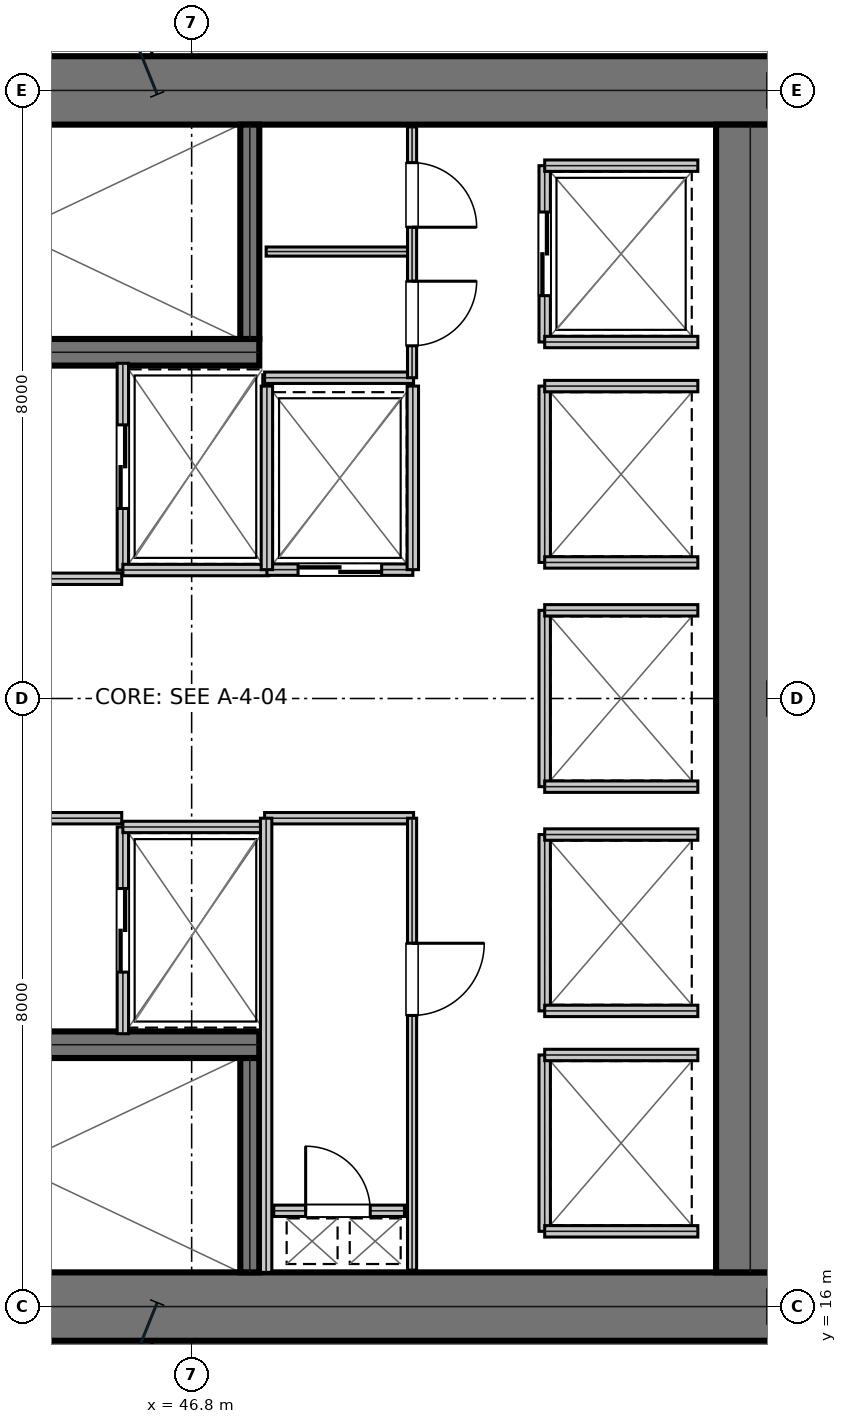
"""IFC4 building model, lengths in metres.
Left out: names, types, materials, properties, quantities, classifications, styles, units other than length and angle.
Written with IfcOpenShell. Run it as: python <this file> out.ifc"""

import sys

from ifc_helpers import new_model, si_unit, direction, frame, frame_2d, origin, place, context, subcontext, project, spatial, rectangle, extrude, element, fill, save


model = new_model("IFC4")
c1 = context("Model", 3, precision=1e-05, world=origin(), true_north=direction((0.0, 1.0)))
c2 = subcontext(c1, "Body", "Model", "MODEL_VIEW")
j1 = project(units=[si_unit("LENGTHUNIT", "METRE"), si_unit("PLANEANGLEUNIT", "RADIAN")], contexts=[c1])
p1 = place(None, origin())
s1 = spatial("IfcSite", under=j1, at=p1, CompositionType="ELEMENT")
p2 = place(p1, origin())
s2 = spatial("IfcBuilding", under=s1, at=p2, CompositionType="ELEMENT")
p3 = place(p2, frame((0.0, 0.0, 62.1)))
s3 = spatial("IfcBuildingStorey", under=s2, at=p3, CompositionType="ELEMENT", Elevation=62.1)
for number, where, z_axis, x_axis in (
    (1, (38.8, 32.0, 0.0), (0.0, 0.0, 1.0), (1.0, 0.0, 0.0)),
    (2, (38.8, 16.0, 0.0), (0.0, 0.0, 1.0), (1.0, 0.0, 0.0)),
):
    element("IfcWall", number, at=place(p3, frame(where, z_axis=z_axis, x_axis=x_axis)), inside=s3, PredefinedType="SHEAR", context=c2, shape_type="SweptSolid", body=[
        extrude(rectangle(XDim=16.0, YDim=0.9, at=frame_2d((8.0, 0.0))), origin(), (0.0, 0.0, 1.0), 3.81),
    ])
p4 = place(p3, frame((54.15, 16.45, 0.0), z_axis=(0.0, 0.0, 1.0), x_axis=(0.0, 1.0, 0.0)))
e3 = element("IfcWall", 3, at=p4, inside=s3, PredefinedType="SHEAR", context=c2, shape_type="SweptSolid", body=[
    extrude(rectangle(XDim=15.1, YDim=0.9, at=frame_2d((7.55, 0.0))), origin(), (0.0, 0.0, 1.0), 3.81),
])
p5 = place(p3, frame((39.98, 28.555, 0.0), z_axis=(0.0, 0.0, 1.0), x_axis=(1.0, 0.0, 0.0)))
e4 = element("IfcWall", 4, at=p5, inside=s3, PredefinedType="SHEAR", context=c2, shape_type="SweptSolid", body=[
    extrude(rectangle(XDim=7.71, YDim=0.35, at=frame_2d((3.855, 0.0))), origin(), (0.0, 0.0, 1.0), 3.81),
])
p6 = place(p5, frame((0.25, 0.0, 0.0)))
e5 = element("IfcOpeningElement", 5, at=p6, cuts=e4, PredefinedType="OPENING", context=c2, shape_type="SweptSolid", body=[
    extrude(rectangle(XDim=1.1, YDim=2.15, at=frame_2d((0.55, 1.075))), frame((0.0, 0.185, 0.0), z_axis=(0.0, -1.0, 0.0), x_axis=(1.0, 0.0, 0.0)), (0.0, 0.0, 1.0), 0.37),
])
p7 = place(p3, frame((39.98, 19.445, 0.0), z_axis=(0.0, 0.0, 1.0), x_axis=(1.0, 0.0, 0.0)))
e6 = element("IfcWall", 6, at=p7, inside=s3, PredefinedType="SHEAR", context=c2, shape_type="SweptSolid", body=[
    extrude(rectangle(XDim=7.71, YDim=0.35, at=frame_2d((3.855, 0.0))), origin(), (0.0, 0.0, 1.0), 3.81),
])
p8 = place(p7, frame((0.25, 0.0, 0.0)))
e7 = element("IfcOpeningElement", 7, at=p8, cuts=e6, PredefinedType="OPENING", context=c2, shape_type="SweptSolid", body=[
    extrude(rectangle(XDim=1.1, YDim=2.15, at=frame_2d((0.55, 1.075))), frame((0.0, 0.185, 0.0), z_axis=(0.0, -1.0, 0.0), x_axis=(1.0, 0.0, 0.0)), (0.0, 0.0, 1.0), 0.37),
])
for number, where, z_axis, x_axis in (
    (8, (47.565, 28.73, 0.0), (0.0, 0.0, 1.0), (0.0, 1.0, 0.0)),
    (9, (47.565, 16.45, 0.0), (0.0, 0.0, 1.0), (0.0, 1.0, 0.0)),
):
    element("IfcWall", number, at=place(p3, frame(where, z_axis=z_axis, x_axis=x_axis)), inside=s3, PredefinedType="SHEAR", context=c2, shape_type="SweptSolid", body=[
        extrude(rectangle(XDim=2.82, YDim=0.25, at=frame_2d((1.41, 0.0))), origin(), (0.0, 0.0, 1.0), 3.81),
    ])
p9 = place(p3, frame((39.98, 25.575, 0.0), z_axis=(0.0, 0.0, 1.0), x_axis=(1.0, 0.0, 0.0)))
e10 = element("IfcWall", 10, at=p9, inside=s3, PredefinedType="PARTITIONING", context=c2, shape_type="SweptSolid", body=[
    extrude(rectangle(XDim=5.9, YDim=0.15, at=frame_2d((2.95, 0.0))), origin(), (0.0, 0.0, 1.0), 3.81),
])
p10 = place(p9, frame((2.35, 0.0, 0.0)))
e11 = element("IfcOpeningElement", 11, at=p10, cuts=e10, PredefinedType="OPENING", context=c2, shape_type="SweptSolid", body=[
    extrude(rectangle(XDim=1.05, YDim=2.15, at=frame_2d((0.525, 1.075))), frame((0.0, 0.085, 0.0), z_axis=(0.0, -1.0, 0.0), x_axis=(1.0, 0.0, 0.0)), (0.0, 0.0, 1.0), 0.17),
])
p11 = place(p3, frame((39.98, 22.425, 0.0), z_axis=(0.0, 0.0, 1.0), x_axis=(1.0, 0.0, 0.0)))
e12 = element("IfcWall", 12, at=p11, inside=s3, PredefinedType="PARTITIONING", context=c2, shape_type="SweptSolid", body=[
    extrude(rectangle(XDim=5.9, YDim=0.15, at=frame_2d((2.95, 0.0))), origin(), (0.0, 0.0, 1.0), 3.81),
])
p12 = place(p11, frame((2.35, 0.0, 0.0)))
e13 = element("IfcOpeningElement", 13, at=p12, cuts=e12, PredefinedType="OPENING", context=c2, shape_type="SweptSolid", body=[
    extrude(rectangle(XDim=1.05, YDim=2.15, at=frame_2d((0.525, 1.075))), frame((0.0, 0.085, 0.0), z_axis=(0.0, -1.0, 0.0), x_axis=(1.0, 0.0, 0.0)), (0.0, 0.0, 1.0), 0.17),
])
p13 = place(p3, frame((45.895, 25.69, 0.0), z_axis=(0.0, 0.0, 1.0), x_axis=(0.0, 1.0, 0.0)))
e14 = element("IfcWall", 14, at=p13, inside=s3, PredefinedType="PARTITIONING", context=c2, shape_type="SweptSolid", body=[
    extrude(rectangle(XDim=2.72, YDim=0.15, at=frame_2d((1.36, 0.0))), origin(), (0.0, 0.0, 1.0), 3.81),
])
p14 = place(p13, frame((0.81, 0.0, 0.0)))
e15 = element("IfcOpeningElement", 15, at=p14, cuts=e14, PredefinedType="OPENING", context=c2, shape_type="SweptSolid", body=[
    extrude(rectangle(XDim=1.1, YDim=2.15, at=frame_2d((0.55, 1.075))), frame((0.0, 0.085, 0.0), z_axis=(0.0, -1.0, 0.0), x_axis=(1.0, 0.0, 0.0)), (0.0, 0.0, 1.0), 0.17),
])
p15 = place(p3, frame((45.895, 25.69, 0.0), z_axis=(0.0, 0.0, 1.0), x_axis=(1.0, 0.0, 0.0)))
e16 = element("IfcWall", 16, at=p15, inside=s3, PredefinedType="PARTITIONING", context=c2, shape_type="SweptSolid", body=[
    extrude(rectangle(XDim=1.915, YDim=0.15, at=frame_2d((0.958, 0.0))), origin(), (0.0, 0.0, 1.0), 3.81),
])
p16 = place(p3, frame((45.895, 19.59, 0.0), z_axis=(0.0, 0.0, 1.0), x_axis=(0.0, 1.0, 0.0)))
e17 = element("IfcWall", 17, at=p16, inside=s3, PredefinedType="PARTITIONING", context=c2, shape_type="SweptSolid", body=[
    extrude(rectangle(XDim=2.72, YDim=0.15, at=frame_2d((1.36, 0.0))), origin(), (0.0, 0.0, 1.0), 3.81),
])
p17 = place(p16, frame((0.81, 0.0, 0.0)))
e18 = element("IfcOpeningElement", 18, at=p17, cuts=e17, PredefinedType="OPENING", context=c2, shape_type="SweptSolid", body=[
    extrude(rectangle(XDim=1.1, YDim=2.15, at=frame_2d((0.55, 1.075))), frame((0.0, 0.085, 0.0), z_axis=(0.0, -1.0, 0.0), x_axis=(1.0, 0.0, 0.0)), (0.0, 0.0, 1.0), 0.17),
])
p18 = place(p3, frame((45.895, 22.31, 0.0), z_axis=(0.0, 0.0, 1.0), x_axis=(1.0, 0.0, 0.0)))
e19 = element("IfcWall", 19, at=p18, inside=s3, PredefinedType="PARTITIONING", context=c2, shape_type="SweptSolid", body=[
    extrude(rectangle(XDim=1.915, YDim=0.15, at=frame_2d((0.958, 0.0))), origin(), (0.0, 0.0, 1.0), 3.81),
])
p19 = place(p3, frame((47.79, 25.695, 0.0), z_axis=(0.0, 0.0, 1.0), x_axis=(1.0, 0.0, 0.0)))
e20 = element("IfcWall", 20, at=p19, inside=s3, PredefinedType="PARTITIONING", context=c2, shape_type="SweptSolid", body=[
    extrude(rectangle(XDim=1.92, YDim=0.15, at=frame_2d((0.96, 0.0))), origin(), (0.0, 0.0, 1.0), 3.81),
])
p20 = place(p19, frame((0.41, 0.0, 0.0)))
e21 = element("IfcOpeningElement", 21, at=p20, cuts=e20, PredefinedType="OPENING", context=c2, shape_type="SweptSolid", body=[
    extrude(rectangle(XDim=1.1, YDim=2.15, at=frame_2d((0.55, 1.075))), frame((0.0, 0.085, 0.0), z_axis=(0.0, -1.0, 0.0), x_axis=(1.0, 0.0, 0.0)), (0.0, 0.0, 1.0), 0.17),
])
for number, where, z_axis, x_axis in (
    (22, (47.79, 25.695, 0.0), (0.0, 0.0, 1.0), (0.0, 1.0, 0.0)),
    (23, (49.71, 25.695, 0.0), (0.0, 0.0, 1.0), (0.0, 1.0, 0.0)),
):
    element("IfcWall", number, at=place(p3, frame(where, z_axis=z_axis, x_axis=x_axis)), inside=s3, PredefinedType="PARTITIONING", context=c2, shape_type="SweptSolid", body=[
        extrude(rectangle(XDim=2.415, YDim=0.15, at=frame_2d((1.208, 0.0))), origin(), (0.0, 0.0, 1.0), 3.81),
    ])
p21 = place(p3, frame((51.445, 28.69, 0.0), z_axis=(0.0, 0.0, 1.0), x_axis=(0.0, 1.0, 0.0)))
e24 = element("IfcWall", 24, at=p21, inside=s3, PredefinedType="PARTITIONING", context=c2, shape_type="SweptSolid", body=[
    extrude(rectangle(XDim=2.32, YDim=0.15, at=frame_2d((1.16, 0.0))), origin(), (0.0, 0.0, 1.0), 3.81),
])
p22 = place(p21, frame((0.61, 0.0, 0.0)))
e25 = element("IfcOpeningElement", 25, at=p22, cuts=e24, PredefinedType="OPENING", context=c2, shape_type="SweptSolid", body=[
    extrude(rectangle(XDim=1.1, YDim=2.15, at=frame_2d((0.55, 1.075))), frame((0.0, 0.085, 0.0), z_axis=(0.0, -1.0, 0.0), x_axis=(1.0, 0.0, 0.0)), (0.0, 0.0, 1.0), 0.17),
])
for number, where, z_axis, x_axis in (
    (26, (51.445, 28.69, 0.0), (0.0, 0.0, 1.0), (1.0, 0.0, 0.0)),
    (27, (51.445, 31.01, 0.0), (0.0, 0.0, 1.0), (1.0, 0.0, 0.0)),
):
    element("IfcWall", number, at=place(p3, frame(where, z_axis=z_axis, x_axis=x_axis)), inside=s3, PredefinedType="PARTITIONING", context=c2, shape_type="SweptSolid", body=[
        extrude(rectangle(XDim=2.015, YDim=0.15, at=frame_2d((1.007, 0.0))), origin(), (0.0, 0.0, 1.0), 3.81),
    ])
p23 = place(p3, frame((51.445, 25.79, 0.0), z_axis=(0.0, 0.0, 1.0), x_axis=(0.0, 1.0, 0.0)))
e28 = element("IfcWall", 28, at=p23, inside=s3, PredefinedType="PARTITIONING", context=c2, shape_type="SweptSolid", body=[
    extrude(rectangle(XDim=2.32, YDim=0.15, at=frame_2d((1.16, 0.0))), origin(), (0.0, 0.0, 1.0), 3.81),
])
for number, where, z_axis, x_axis in (
    (29, (51.445, 25.79, 0.0), (0.0, 0.0, 1.0), (1.0, 0.0, 0.0)),
    (30, (51.445, 28.11, 0.0), (0.0, 0.0, 1.0), (1.0, 0.0, 0.0)),
):
    element("IfcWall", number, at=place(p3, frame(where, z_axis=z_axis, x_axis=x_axis)), inside=s3, PredefinedType="PARTITIONING", context=c2, shape_type="SweptSolid", body=[
        extrude(rectangle(XDim=2.015, YDim=0.15, at=frame_2d((1.007, 0.0))), origin(), (0.0, 0.0, 1.0), 3.81),
    ])
p24 = place(p3, frame((51.445, 19.89, 0.0), z_axis=(0.0, 0.0, 1.0), x_axis=(0.0, 1.0, 0.0)))
e31 = element("IfcWall", 31, at=p24, inside=s3, PredefinedType="PARTITIONING", context=c2, shape_type="SweptSolid", body=[
    extrude(rectangle(XDim=2.32, YDim=0.15, at=frame_2d((1.16, 0.0))), origin(), (0.0, 0.0, 1.0), 3.81),
])
for number, where, z_axis, x_axis in (
    (32, (51.445, 19.89, 0.0), (0.0, 0.0, 1.0), (1.0, 0.0, 0.0)),
    (33, (51.445, 22.21, 0.0), (0.0, 0.0, 1.0), (1.0, 0.0, 0.0)),
):
    element("IfcWall", number, at=place(p3, frame(where, z_axis=z_axis, x_axis=x_axis)), inside=s3, PredefinedType="PARTITIONING", context=c2, shape_type="SweptSolid", body=[
        extrude(rectangle(XDim=2.015, YDim=0.15, at=frame_2d((1.007, 0.0))), origin(), (0.0, 0.0, 1.0), 3.81),
    ])
p25 = place(p3, frame((51.445, 22.84, 0.0), z_axis=(0.0, 0.0, 1.0), x_axis=(0.0, 1.0, 0.0)))
e34 = element("IfcWall", 34, at=p25, inside=s3, PredefinedType="PARTITIONING", context=c2, shape_type="SweptSolid", body=[
    extrude(rectangle(XDim=2.32, YDim=0.15, at=frame_2d((1.16, 0.0))), origin(), (0.0, 0.0, 1.0), 3.81),
])
for number, where, z_axis, x_axis in (
    (35, (51.445, 22.84, 0.0), (0.0, 0.0, 1.0), (1.0, 0.0, 0.0)),
    (36, (51.445, 25.16, 0.0), (0.0, 0.0, 1.0), (1.0, 0.0, 0.0)),
):
    element("IfcWall", number, at=place(p3, frame(where, z_axis=z_axis, x_axis=x_axis)), inside=s3, PredefinedType="PARTITIONING", context=c2, shape_type="SweptSolid", body=[
        extrude(rectangle(XDim=2.015, YDim=0.15, at=frame_2d((1.007, 0.0))), origin(), (0.0, 0.0, 1.0), 3.81),
    ])
p26 = place(p3, frame((51.445, 16.99, 0.0), z_axis=(0.0, 0.0, 1.0), x_axis=(0.0, 1.0, 0.0)))
e37 = element("IfcWall", 37, at=p26, inside=s3, PredefinedType="PARTITIONING", context=c2, shape_type="SweptSolid", body=[
    extrude(rectangle(XDim=2.32, YDim=0.15, at=frame_2d((1.16, 0.0))), origin(), (0.0, 0.0, 1.0), 3.81),
])
for number, where, z_axis, x_axis in (
    (38, (51.445, 16.99, 0.0), (0.0, 0.0, 1.0), (1.0, 0.0, 0.0)),
    (39, (51.445, 19.31, 0.0), (0.0, 0.0, 1.0), (1.0, 0.0, 0.0)),
):
    element("IfcWall", number, at=place(p3, frame(where, z_axis=z_axis, x_axis=x_axis)), inside=s3, PredefinedType="PARTITIONING", context=c2, shape_type="SweptSolid", body=[
        extrude(rectangle(XDim=2.015, YDim=0.15, at=frame_2d((1.007, 0.0))), origin(), (0.0, 0.0, 1.0), 3.81),
    ])
p27 = place(p3, frame((47.88, 17.26, 0.0), z_axis=(0.0, 0.0, 1.0), x_axis=(1.0, 0.0, 0.0)))
e40 = element("IfcWall", 40, at=p27, inside=s3, PredefinedType="PARTITIONING", context=c2, shape_type="SweptSolid", body=[
    extrude(rectangle(XDim=1.72, YDim=0.15, at=frame_2d((0.86, 0.0))), origin(), (0.0, 0.0, 1.0), 3.81),
])
p28 = place(p27, frame((0.42, 0.0, 0.0)))
e41 = element("IfcOpeningElement", 41, at=p28, cuts=e40, PredefinedType="OPENING", context=c2, shape_type="SweptSolid", body=[
    extrude(rectangle(XDim=0.85, YDim=2.15, at=frame_2d((0.425, 1.075))), frame((0.0, 0.085, 0.0), z_axis=(0.0, -1.0, 0.0), x_axis=(1.0, 0.0, 0.0)), (0.0, 0.0, 1.0), 0.17),
])
p29 = place(p3, frame((47.76, 22.425, 0.0), z_axis=(0.0, 0.0, 1.0), x_axis=(1.0, 0.0, 0.0)))
e42 = element("IfcWall", 42, at=p29, inside=s3, PredefinedType="PARTITIONING", context=c2, shape_type="SweptSolid", body=[
    extrude(rectangle(XDim=1.96, YDim=0.15, at=frame_2d((0.98, 0.0))), origin(), (0.0, 0.0, 1.0), 3.81),
])
p30 = place(p3, frame((47.78, 16.45, 0.0), z_axis=(0.0, 0.0, 1.0), x_axis=(0.0, 1.0, 0.0)))
e43 = element("IfcWall", 43, at=p30, inside=s3, PredefinedType="PARTITIONING", context=c2, shape_type="SweptSolid", body=[
    extrude(rectangle(XDim=5.975, YDim=0.15, at=frame_2d((2.988, 0.0))), origin(), (0.0, 0.0, 1.0), 3.81),
])
p31 = place(p3, frame((49.7, 16.48, 0.0), z_axis=(0.0, 0.0, 1.0), x_axis=(0.0, 1.0, 0.0)))
e44 = element("IfcWall", 44, at=p31, inside=s3, PredefinedType="PARTITIONING", context=c2, shape_type="SweptSolid", body=[
    extrude(rectangle(XDim=5.945, YDim=0.12, at=frame_2d((2.973, 0.0))), origin(), (0.0, 0.0, 1.0), 3.81),
])
p32 = place(p31, frame((3.35, 0.0, 0.0)))
e45 = element("IfcOpeningElement", 45, at=p32, cuts=e44, PredefinedType="OPENING", context=c2, shape_type="SweptSolid", body=[
    extrude(rectangle(XDim=0.95, YDim=2.15, at=frame_2d((0.475, 1.075))), frame((0.0, 0.07, 0.0), z_axis=(0.0, -1.0, 0.0), x_axis=(1.0, 0.0, 0.0)), (0.0, 0.0, 1.0), 0.14),
])
p33 = place(p3, frame((47.76, 28.22, 0.0), z_axis=(0.0, 0.0, 1.0), x_axis=(1.0, 0.0, 0.0)))
e46 = element("IfcWall", 46, at=p33, inside=s3, PredefinedType="PARTITIONING", context=c2, shape_type="SweptSolid", body=[
    extrude(rectangle(XDim=1.96, YDim=0.15, at=frame_2d((0.98, 0.0))), origin(), (0.0, 0.0, 1.0), 3.81),
])
p34 = place(p3, frame((47.78, 29.88, 0.0), z_axis=(0.0, 0.0, 1.0), x_axis=(1.0, 0.0, 0.0)))
e47 = element("IfcWall", 47, at=p34, inside=s3, PredefinedType="PARTITIONING", context=c2, shape_type="SweptSolid", body=[
    extrude(rectangle(XDim=1.92, YDim=0.12, at=frame_2d((0.96, 0.0))), origin(), (0.0, 0.0, 1.0), 3.81),
])
p35 = place(p3, frame((49.7, 28.22, 0.0), z_axis=(0.0, 0.0, 1.0), x_axis=(0.0, 1.0, 0.0)))
e48 = element("IfcWall", 48, at=p35, inside=s3, PredefinedType="PARTITIONING", context=c2, shape_type="SweptSolid", body=[
    extrude(rectangle(XDim=3.3, YDim=0.12, at=frame_2d((1.65, 0.0))), origin(), (0.0, 0.0, 1.0), 3.81),
])
p36 = place(p35, frame((0.42, 0.0, 0.0)))
e49 = element("IfcOpeningElement", 49, at=p36, cuts=e48, PredefinedType="OPENING", context=c2, shape_type="SweptSolid", body=[
    extrude(rectangle(XDim=0.85, YDim=2.15, at=frame_2d((0.425, 1.075))), frame((0.0, 0.07, 0.0), z_axis=(0.0, -1.0, 0.0), x_axis=(1.0, 0.0, 0.0)), (0.0, 0.0, 1.0), 0.14),
])
p37 = place(p35, frame((1.98, 0.0, 0.0)))
e50 = element("IfcOpeningElement", 50, at=p37, cuts=e48, PredefinedType="OPENING", context=c2, shape_type="SweptSolid", body=[
    extrude(rectangle(XDim=0.85, YDim=2.15, at=frame_2d((0.425, 1.075))), frame((0.0, 0.07, 0.0), z_axis=(0.0, -1.0, 0.0), x_axis=(1.0, 0.0, 0.0)), (0.0, 0.0, 1.0), 0.14),
])
p38 = place(p14, frame((1.1, 0.0, 0.0), z_axis=(0.0, 0.0, 1.0), x_axis=(-1.0, 0.0, 0.0)))
e51 = element("IfcDoor", 51, at=p38, inside=s3, OperationType="DOUBLE_DOOR_SLIDING", PredefinedType="DOOR", context=c2, shape_type="SweptSolid", body=[
    extrude(rectangle(XDim=1.1, YDim=2.15, at=frame_2d((0.55, 1.075))), frame((0.0, 0.025, 0.0), z_axis=(0.0, -1.0, 0.0), x_axis=(1.0, 0.0, 0.0)), (0.0, 0.0, 1.0), 0.05),
])
fill(e15, e51)
p39 = place(p17, frame((1.1, 0.0, 0.0), z_axis=(0.0, 0.0, 1.0), x_axis=(-1.0, 0.0, 0.0)))
e52 = element("IfcDoor", 52, at=p39, inside=s3, OperationType="DOUBLE_DOOR_SLIDING", PredefinedType="DOOR", context=c2, shape_type="SweptSolid", body=[
    extrude(rectangle(XDim=1.1, YDim=2.15, at=frame_2d((0.55, 1.075))), frame((0.0, 0.025, 0.0), z_axis=(0.0, -1.0, 0.0), x_axis=(1.0, 0.0, 0.0)), (0.0, 0.0, 1.0), 0.05),
])
fill(e18, e52)
p40 = place(p20, frame((1.1, 0.0, 0.0), z_axis=(0.0, 0.0, 1.0), x_axis=(-1.0, 0.0, 0.0)))
e53 = element("IfcDoor", 53, at=p40, inside=s3, OperationType="DOUBLE_DOOR_SLIDING", PredefinedType="DOOR", context=c2, shape_type="SweptSolid", body=[
    extrude(rectangle(XDim=1.1, YDim=2.15, at=frame_2d((0.55, 1.075))), frame((0.0, 0.025, 0.0), z_axis=(0.0, -1.0, 0.0), x_axis=(1.0, 0.0, 0.0)), (0.0, 0.0, 1.0), 0.05),
])
fill(e21, e53)
p41 = place(p22, frame((1.1, 0.0, 0.0), z_axis=(0.0, 0.0, 1.0), x_axis=(-1.0, 0.0, 0.0)))
e54 = element("IfcDoor", 54, at=p41, inside=s3, OperationType="DOUBLE_DOOR_SLIDING", PredefinedType="DOOR", context=c2, shape_type="SweptSolid", body=[
    extrude(rectangle(XDim=1.1, YDim=2.15, at=frame_2d((0.55, 1.075))), frame((0.0, 0.025, 0.0), z_axis=(0.0, -1.0, 0.0), x_axis=(1.0, 0.0, 0.0)), (0.0, 0.0, 1.0), 0.05),
])
fill(e25, e54)
p42 = place(p28, origin())
e55 = element("IfcDoor", 55, at=p42, inside=s3, OperationType="SINGLE_SWING_LEFT", PredefinedType="TRAPDOOR", context=c2, shape_type="SweptSolid", body=[
    extrude(rectangle(XDim=0.85, YDim=2.15, at=frame_2d((0.425, 1.075))), frame((0.0, 0.025, 0.0), z_axis=(0.0, -1.0, 0.0), x_axis=(1.0, 0.0, 0.0)), (0.0, 0.0, 1.0), 0.05),
])
fill(e41, e55)
p43 = place(p32, frame((0.95, 0.0, 0.0), z_axis=(0.0, 0.0, 1.0), x_axis=(-1.0, 0.0, 0.0)))
e56 = element("IfcDoor", 56, at=p43, inside=s3, OperationType="SINGLE_SWING_LEFT", PredefinedType="DOOR", context=c2, shape_type="SweptSolid", body=[
    extrude(rectangle(XDim=0.95, YDim=2.15, at=frame_2d((0.475, 1.075))), frame((0.0, 0.025, 0.0), z_axis=(0.0, -1.0, 0.0), x_axis=(1.0, 0.0, 0.0)), (0.0, 0.0, 1.0), 0.05),
])
fill(e45, e56)
p44 = place(p36, frame((0.85, 0.0, 0.0), z_axis=(0.0, 0.0, 1.0), x_axis=(-1.0, 0.0, 0.0)))
e57 = element("IfcDoor", 57, at=p44, inside=s3, OperationType="SINGLE_SWING_LEFT", PredefinedType="DOOR", context=c2, shape_type="SweptSolid", body=[
    extrude(rectangle(XDim=0.85, YDim=2.15, at=frame_2d((0.425, 1.075))), frame((0.0, 0.025, 0.0), z_axis=(0.0, -1.0, 0.0), x_axis=(1.0, 0.0, 0.0)), (0.0, 0.0, 1.0), 0.05),
])
fill(e49, e57)
p45 = place(p37, frame((0.85, 0.0, 0.0), z_axis=(0.0, 0.0, 1.0), x_axis=(-1.0, 0.0, 0.0)))
e58 = element("IfcDoor", 58, at=p45, inside=s3, OperationType="SINGLE_SWING_RIGHT", PredefinedType="DOOR", context=c2, shape_type="SweptSolid", body=[
    extrude(rectangle(XDim=0.85, YDim=2.15, at=frame_2d((0.425, 1.075))), frame((0.0, 0.025, 0.0), z_axis=(0.0, -1.0, 0.0), x_axis=(1.0, 0.0, 0.0)), (0.0, 0.0, 1.0), 0.05),
])
fill(e50, e58)
save(model, sys.argv[1])
